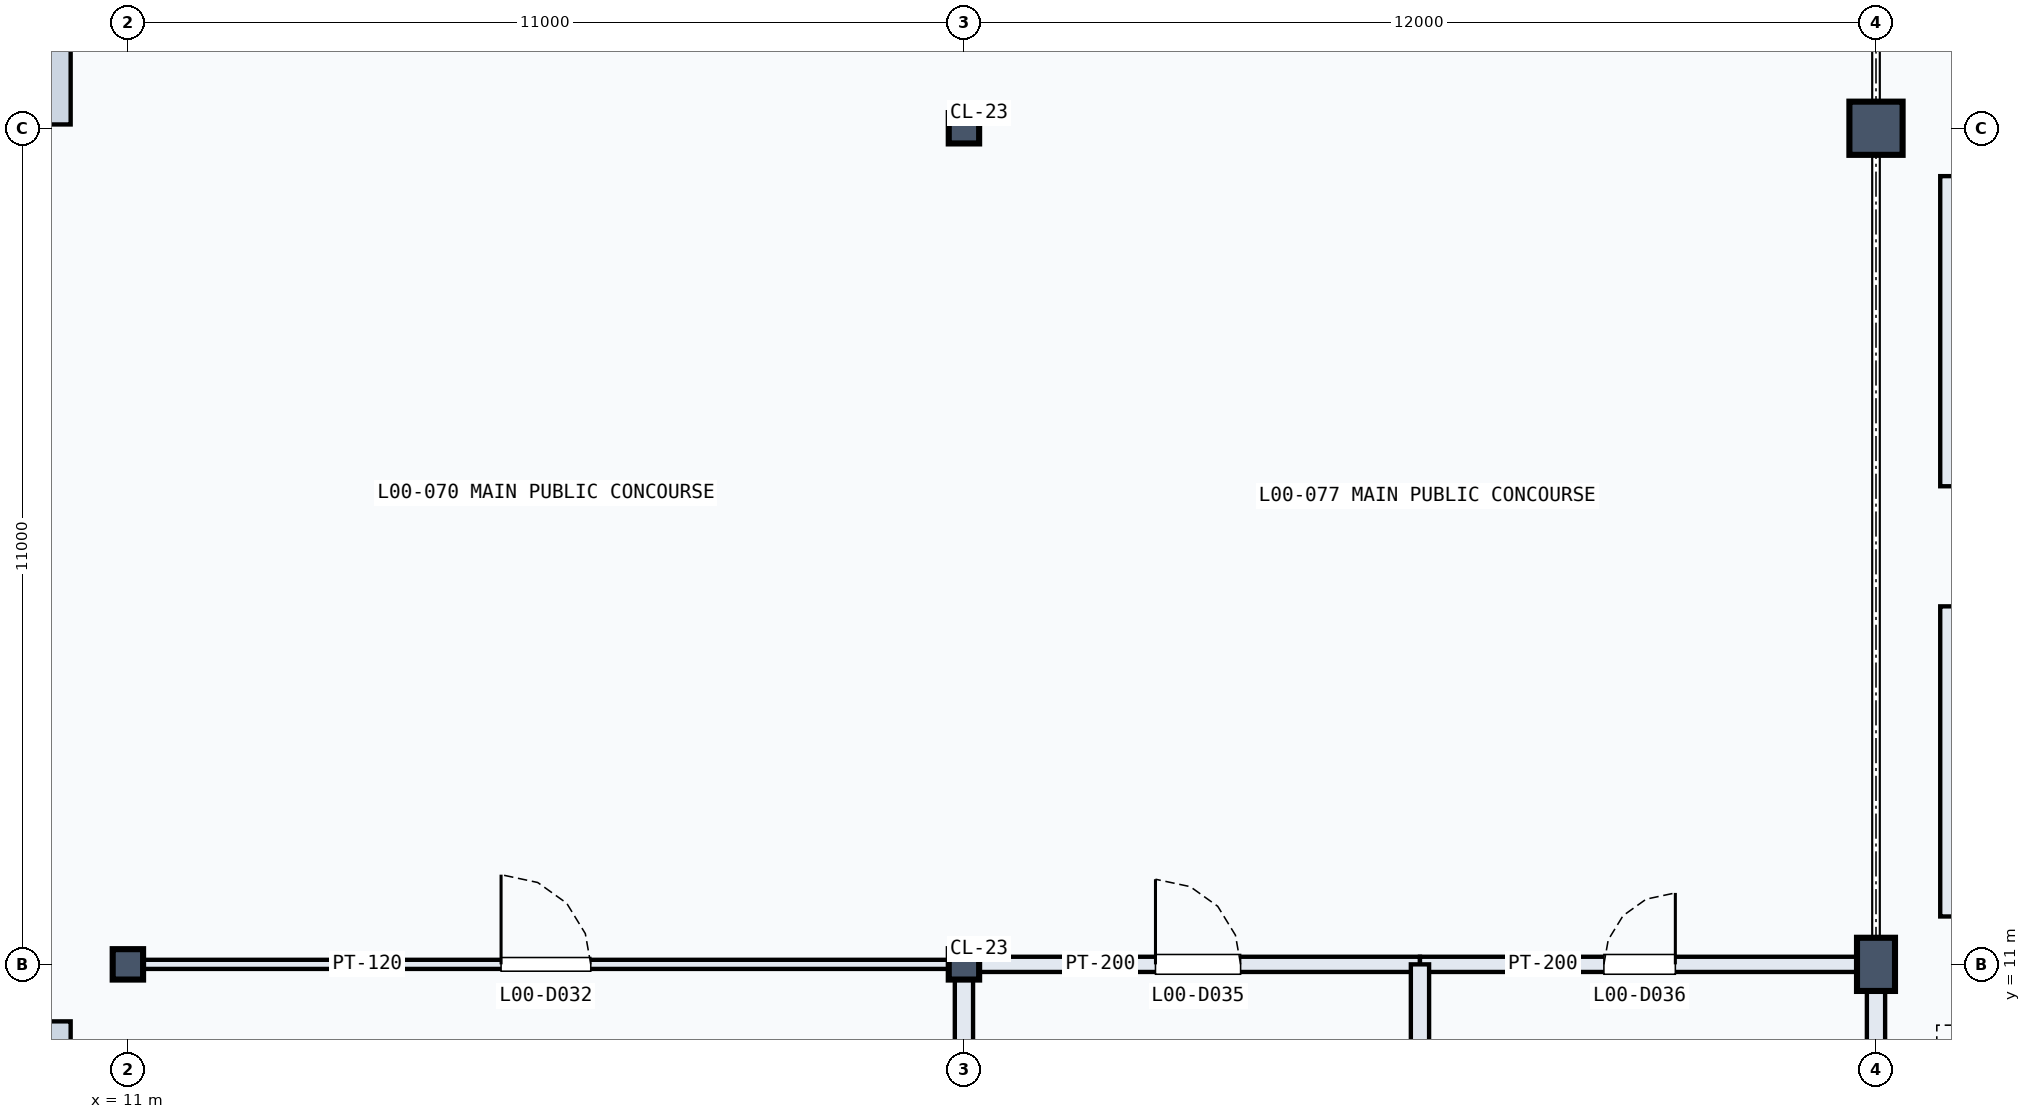
"""IFC4 building model, lengths in metres.
Left out: names, types, materials, properties, quantities, classifications, styles, units other than length and angle.
Written with IfcOpenShell. Run it as: python <this file> out.ifc"""

import sys

from ifc_helpers import new_model, si_unit, direction, frame, frame_2d, origin, origin_2d, place, context, subcontext, project, spatial, rectangle, hollow_rectangle, extrude, element, fill, save


model = new_model("IFC4")
c1 = context("Model", 3, precision=1e-05, world=origin(), true_north=direction((0.0, 1.0)))
c2 = subcontext(c1, "Body", "Model", "MODEL_VIEW")
j1 = project(units=[si_unit("LENGTHUNIT", "METRE"), si_unit("PLANEANGLEUNIT", "RADIAN")], contexts=[c1])
p1 = place(None, origin())
s1 = spatial("IfcSite", under=j1, at=p1, CompositionType="ELEMENT")
p2 = place(p1, origin())
s2 = spatial("IfcBuilding", under=s1, at=p2, CompositionType="ELEMENT")
p3 = place(p2, origin())
s3 = spatial("IfcBuildingStorey", under=s2, at=p3, CompositionType="ELEMENT", Elevation=0.0)
for number, where, z_axis, x_axis in (
    (1, (11.0, 11.0, 0.0), (0.0, 0.0, 1.0), (1.0, 0.0, 0.0)),
    (2, (22.0, 11.0, 0.0), (0.0, 0.0, 1.0), (1.0, 0.0, 0.0)),
    (3, (22.0, 22.0, 0.0), (0.0, 0.0, 1.0), (1.0, 0.0, 0.0)),
):
    element("IfcColumn", number, at=place(p3, frame(where, z_axis=z_axis, x_axis=x_axis)), inside=s3, PredefinedType="COLUMN", context=c2, shape_type="SweptSolid", body=[
        extrude(hollow_rectangle(XDim=0.4, YDim=0.4, WallThickness=0.02, at=origin_2d()), origin(), (0.0, 0.0, 1.0), 5.4),
    ])
p4 = place(p3, frame((34.0, 11.0, 0.0), z_axis=(0.0, 0.0, 1.0), x_axis=(1.0, 0.0, 0.0)))
e4 = element("IfcColumn", 4, at=p4, inside=s3, PredefinedType="COLUMN", context=c2, shape_type="SweptSolid", body=[
    extrude(rectangle(XDim=0.5, YDim=0.7, at=origin_2d()), origin(), (0.0, 0.0, 1.0), 5.4),
])
p5 = place(p3, frame((34.0, 22.0, 0.0), z_axis=(0.0, 0.0, 1.0), x_axis=(1.0, 0.0, 0.0)))
e5 = element("IfcColumn", 5, at=p5, inside=s3, PredefinedType="COLUMN", context=c2, shape_type="SweptSolid", body=[
    extrude(rectangle(XDim=0.7, YDim=0.7, at=origin_2d()), origin(), (0.0, 0.0, 1.0), 5.4),
])
for number, where, z_axis, x_axis in (
    (6, (34.96, 11.63, 0.0), (0.0, 0.0, 1.0), (0.0, 1.0, 0.0)),
    (7, (34.96, 17.29, 0.0), (0.0, 0.0, 1.0), (0.0, 1.0, 0.0)),
):
    element("IfcWall", number, at=place(p3, frame(where, z_axis=z_axis, x_axis=x_axis)), inside=s3, PredefinedType="SOLIDWALL", context=c2, shape_type="SweptSolid", body=[
        extrude(rectangle(XDim=4.08, YDim=0.23, at=frame_2d((2.04, 0.0))), origin(), (0.0, 0.0, 1.0), 4.45),
    ])
p6 = place(p3, frame((10.072, 22.05, 0.0), z_axis=(0.0, 0.0, 1.0), x_axis=(0.0, 1.0, 0.0)))
e8 = element("IfcWall", 8, at=p6, inside=s3, PredefinedType="SOLIDWALL", context=c2, shape_type="SweptSolid", body=[
    extrude(rectangle(XDim=4.5, YDim=0.35, at=frame_2d((2.25, 0.0))), origin(), (0.0, 0.0, 1.0), 5.06),
])
p7 = place(p3, frame((10.072, 6.45, 0.0), z_axis=(0.0, 0.0, 1.0), x_axis=(0.0, 1.0, 0.0)))
e9 = element("IfcWall", 9, at=p7, inside=s3, PredefinedType="SOLIDWALL", context=c2, shape_type="SweptSolid", body=[
    extrude(rectangle(XDim=3.8, YDim=0.35, at=frame_2d((1.9, 0.0))), origin(), (0.0, 0.0, 1.0), 5.06),
])
p8 = place(p3, frame((11.16, 11.0, 0.0), z_axis=(0.0, 0.0, 1.0), x_axis=(1.0, 0.0, 0.0)))
e10 = element("IfcWall", 10, at=p8, inside=s3, PredefinedType="PARTITIONING", context=c2, shape_type="SweptSolid", body=[
    extrude(rectangle(XDim=10.68, YDim=0.12, at=frame_2d((5.34, 0.0))), origin(), (0.0, 0.0, 1.0), 4.3),
])
p9 = place(p8, frame((4.75, 0.0, 0.0)))
e11 = element("IfcOpeningElement", 11, at=p9, cuts=e10, PredefinedType="OPENING", context=c2, shape_type="SweptSolid", body=[
    extrude(rectangle(XDim=1.18, YDim=2.15, at=frame_2d((0.59, 1.075))), frame((0.0, 0.07, 0.0), z_axis=(0.0, -1.0, 0.0), x_axis=(1.0, 0.0, 0.0)), (0.0, 0.0, 1.0), 0.14),
])
p10 = place(p3, frame((22.16, 11.0, 0.0), z_axis=(0.0, 0.0, 1.0), x_axis=(1.0, 0.0, 0.0)))
e12 = element("IfcWall", 12, at=p10, inside=s3, PredefinedType="PARTITIONING", context=c2, shape_type="SweptSolid", body=[
    extrude(rectangle(XDim=5.84, YDim=0.2, at=frame_2d((2.92, 0.0))), origin(), (0.0, 0.0, 1.0), 4.43),
])
p11 = place(p10, frame((2.36, 0.0, 0.0)))
e13 = element("IfcOpeningElement", 13, at=p11, cuts=e12, PredefinedType="OPENING", context=c2, shape_type="SweptSolid", body=[
    extrude(rectangle(XDim=1.12, YDim=2.25, at=frame_2d((0.56, 1.125))), frame((0.0, 0.11, 0.0), z_axis=(0.0, -1.0, 0.0), x_axis=(1.0, 0.0, 0.0)), (0.0, 0.0, 1.0), 0.22),
])
p12 = place(p3, frame((28.0, 11.0, 0.0), z_axis=(0.0, 0.0, 1.0), x_axis=(1.0, 0.0, 0.0)))
e14 = element("IfcWall", 14, at=p12, inside=s3, PredefinedType="PARTITIONING", context=c2, shape_type="SweptSolid", body=[
    extrude(rectangle(XDim=5.78, YDim=0.2, at=frame_2d((2.89, 0.0))), origin(), (0.0, 0.0, 1.0), 4.366),
])
p13 = place(p12, frame((2.42, 0.0, 0.0)))
e15 = element("IfcOpeningElement", 15, at=p13, cuts=e14, PredefinedType="OPENING", context=c2, shape_type="SweptSolid", body=[
    extrude(rectangle(XDim=0.94, YDim=2.15, at=frame_2d((0.47, 1.075))), frame((0.0, 0.11, 0.0), z_axis=(0.0, -1.0, 0.0), x_axis=(1.0, 0.0, 0.0)), (0.0, 0.0, 1.0), 0.22),
])
p14 = place(p3, frame((22.0, 2.4, 0.0), z_axis=(0.0, 0.0, 1.0), x_axis=(0.0, 1.0, 0.0)))
e16 = element("IfcWall", 16, at=p14, inside=s3, PredefinedType="PARTITIONING", context=c2, shape_type="SweptSolid", body=[
    extrude(rectangle(XDim=8.44, YDim=0.24, at=frame_2d((4.22, 0.0))), origin(), (0.0, 0.0, 1.0), 4.43),
])
p15 = place(p3, frame((28.0, 2.4, 0.0), z_axis=(0.0, 0.0, 1.0), x_axis=(0.0, 1.0, 0.0)))
e17 = element("IfcWall", 17, at=p15, inside=s3, PredefinedType="PARTITIONING", context=c2, shape_type="SweptSolid", body=[
    extrude(rectangle(XDim=8.6, YDim=0.24, at=frame_2d((4.3, 0.0))), origin(), (0.0, 0.0, 1.0), 4.45),
])
p16 = place(p3, frame((34.0, 2.4, 0.0), z_axis=(0.0, 0.0, 1.0), x_axis=(0.0, 1.0, 0.0)))
e18 = element("IfcWall", 18, at=p16, inside=s3, PredefinedType="PARTITIONING", context=c2, shape_type="SweptSolid", body=[
    extrude(rectangle(XDim=8.38, YDim=0.24, at=frame_2d((4.19, 0.0))), origin(), (0.0, 0.0, 1.0), 4.366),
])
p17 = place(p9, origin())
e19 = element("IfcDoor", 19, at=p17, inside=s3, OperationType="SINGLE_SWING_LEFT", PredefinedType="DOOR", context=c2, shape_type="SweptSolid", body=[
    extrude(rectangle(XDim=1.18, YDim=2.15, at=frame_2d((0.59, 1.075))), frame((0.0, 0.025, 0.0), z_axis=(0.0, -1.0, 0.0), x_axis=(1.0, 0.0, 0.0)), (0.0, 0.0, 1.0), 0.05),
])
fill(e11, e19)
p18 = place(p11, origin())
e20 = element("IfcDoor", 20, at=p18, inside=s3, OperationType="SINGLE_SWING_LEFT", PredefinedType="DOOR", context=c2, shape_type="SweptSolid", body=[
    extrude(rectangle(XDim=1.12, YDim=2.25, at=frame_2d((0.56, 1.125))), frame((0.0, 0.025, 0.0), z_axis=(0.0, -1.0, 0.0), x_axis=(1.0, 0.0, 0.0)), (0.0, 0.0, 1.0), 0.05),
])
fill(e13, e20)
p19 = place(p13, origin())
e21 = element("IfcDoor", 21, at=p19, inside=s3, OperationType="SINGLE_SWING_RIGHT", PredefinedType="DOOR", context=c2, shape_type="SweptSolid", body=[
    extrude(rectangle(XDim=0.94, YDim=2.15, at=frame_2d((0.47, 1.075))), frame((0.0, 0.025, 0.0), z_axis=(0.0, -1.0, 0.0), x_axis=(1.0, 0.0, 0.0)), (0.0, 0.0, 1.0), 0.05),
])
fill(e15, e21)
save(model, sys.argv[1])
